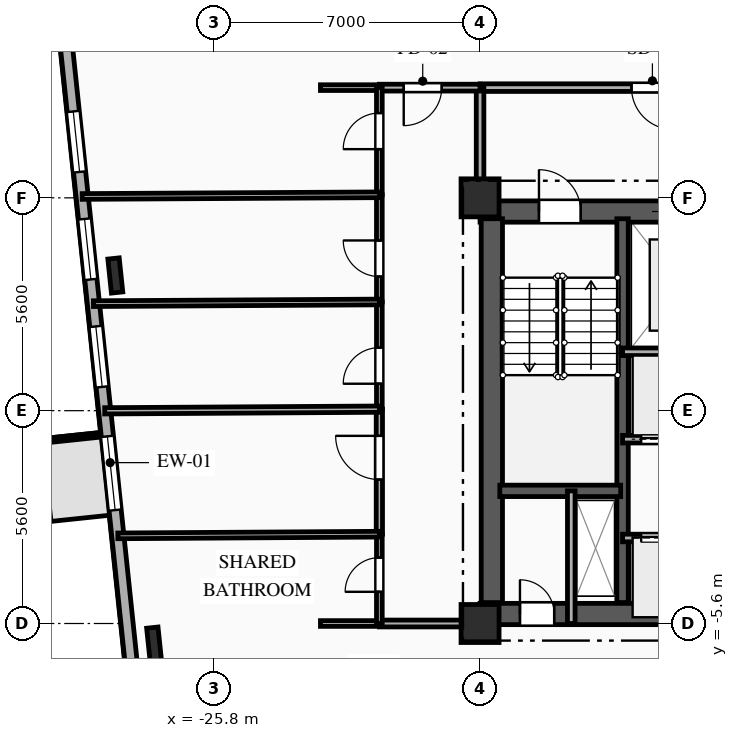
"""IFC4 building model, lengths in metres.
Left out: names, types, materials, properties, quantities, classifications, styles, units other than length and angle.
Written with IfcOpenShell. Run it as: python <this file> out.ifc"""

import sys

from ifc_helpers import new_model, si_unit, direction, frame, frame_2d, origin, origin_2d, place, context, subcontext, project, spatial, rectangle, i_section, extrude, element, fill, save


model = new_model("IFC4")
c1 = context("Model", 3, precision=1e-05, world=origin(), true_north=direction((0.0, 1.0)))
c2 = subcontext(c1, "Body", "Model", "MODEL_VIEW")
j1 = project(units=[si_unit("LENGTHUNIT", "METRE"), si_unit("PLANEANGLEUNIT", "RADIAN")], contexts=[c1])
p1 = place(None, origin())
s1 = spatial("IfcSite", under=j1, at=p1, CompositionType="ELEMENT")
p2 = place(p1, origin())
s2 = spatial("IfcBuilding", under=s1, at=p2, CompositionType="ELEMENT")
p3 = place(p2, frame((0.0, 0.0, 85.7)))
s3 = spatial("IfcBuildingStorey", under=s2, at=p3, CompositionType="ELEMENT", Elevation=85.7)
for number, where, z_axis, x_axis in (
    (1, (-18.8, -5.6, 0.0), (0.0, 0.0, 1.0), (1.0, 0.0, 0.0)),
    (2, (-18.8, 5.6, 0.0), (0.0, 0.0, 1.0), (1.0, 0.0, 0.0)),
):
    element("IfcColumn", number, at=place(p3, frame(where, z_axis=z_axis, x_axis=x_axis)), inside=s3, PredefinedType="COLUMN", context=c2, shape_type="SweptSolid", body=[
        extrude(rectangle(XDim=1.0, YDim=1.0, at=origin_2d()), origin(), (0.0, 0.0, 1.0), 3.35),
    ])
for number, where, z_axis, x_axis in (
    (3, (-28.398, 3.557, 0.0), (0.0, 0.0, 1.0), (0.995, 0.105, 0.0)),
    (4, (-27.377, -6.156, 0.0), (0.0, 0.0, 1.0), (0.995, 0.105, 0.0)),
):
    element("IfcColumn", number, at=place(p3, frame(where, z_axis=z_axis, x_axis=x_axis)), inside=s3, PredefinedType="COLUMN", context=c2, shape_type="SweptSolid", body=[
        extrude(i_section(OverallWidth=0.3, OverallDepth=0.9, WebThickness=0.019, FlangeThickness=0.035, FilletRadius=0.03, at=origin_2d()), origin(), (0.0, 0.0, 1.0), 3.35),
    ])
p4 = place(p3, frame((-26.935, -16.583, 0.0), z_axis=(0.0, 0.0, 1.0), x_axis=(-0.104524887486, 0.994522271192, 0.0)))
e5 = element("IfcWall", 5, at=p4, inside=s3, PredefinedType="SOLIDWALL", context=c2, shape_type="SweptSolid", body=[
    extrude(rectangle(XDim=30.6, YDim=0.32, at=frame_2d((15.3, 0.0))), origin(), (0.0, 0.0, 1.0), 3.045),
])
p5 = place(p4, frame((14.045, 0.0, 0.85)))
e6 = element("IfcOpeningElement", 6, at=p5, cuts=e5, PredefinedType="OPENING", context=c2, shape_type="SweptSolid", body=[
    extrude(rectangle(XDim=1.95, YDim=1.85, at=frame_2d((0.975, 0.925))), frame((0.0, 0.17, 0.0), z_axis=(0.0, -1.0, 0.0), x_axis=(1.0, 0.0, 0.0)), (0.0, 0.0, 1.0), 0.34),
])
p6 = place(p4, frame((17.304, 0.0, 0.85)))
e7 = element("IfcOpeningElement", 7, at=p6, cuts=e5, PredefinedType="OPENING", context=c2, shape_type="SweptSolid", body=[
    extrude(rectangle(XDim=1.6, YDim=1.85, at=frame_2d((0.8, 0.925))), frame((0.0, 0.17, 0.0), z_axis=(0.0, -1.0, 0.0), x_axis=(1.0, 0.0, 0.0)), (0.0, 0.0, 1.0), 0.34),
])
p7 = place(p4, frame((20.147, 0.0, 0.85)))
e8 = element("IfcOpeningElement", 8, at=p7, cuts=e5, PredefinedType="OPENING", context=c2, shape_type="SweptSolid", body=[
    extrude(rectangle(XDim=1.6, YDim=1.85, at=frame_2d((0.8, 0.925))), frame((0.0, 0.17, 0.0), z_axis=(0.0, -1.0, 0.0), x_axis=(1.0, 0.0, 0.0)), (0.0, 0.0, 1.0), 0.34),
])
p8 = place(p4, frame((22.991, 0.0, 0.85)))
e9 = element("IfcOpeningElement", 9, at=p8, cuts=e5, PredefinedType="OPENING", context=c2, shape_type="SweptSolid", body=[
    extrude(rectangle(XDim=1.6, YDim=1.85, at=frame_2d((0.8, 0.925))), frame((0.0, 0.17, 0.0), z_axis=(0.0, -1.0, 0.0), x_axis=(1.0, 0.0, 0.0)), (0.0, 0.0, 1.0), 0.34),
])
p9 = place(p3, frame((-18.8, 5.24, 0.0), z_axis=(0.0, 0.0, 1.0), x_axis=(1.0, 0.0, 0.0)))
e10 = element("IfcWall", 10, at=p9, inside=s3, PredefinedType="SHEAR", context=c2, shape_type="SweptSolid", body=[
    extrude(rectangle(XDim=9.6, YDim=0.56, at=frame_2d((4.8, 0.0))), origin(), (0.0, 0.0, 1.0), 3.045),
])
p10 = place(p9, frame((1.55, 0.0, 0.0)))
e11 = element("IfcOpeningElement", 11, at=p10, cuts=e10, PredefinedType="OPENING", context=c2, shape_type="SweptSolid", body=[
    extrude(rectangle(XDim=1.1, YDim=2.15, at=frame_2d((0.55, 1.075))), frame((0.0, 0.29, 0.0), z_axis=(0.0, -1.0, 0.0), x_axis=(1.0, 0.0, 0.0)), (0.0, 0.0, 1.0), 0.58),
])
p11 = place(p9, frame((4.775, 0.0, 0.0)))
e12 = element("IfcOpeningElement", 12, at=p11, cuts=e10, PredefinedType="OPENING", context=c2, shape_type="SweptSolid", body=[
    extrude(rectangle(XDim=1.05, YDim=2.1, at=frame_2d((0.525, 1.05))), frame((0.0, 0.29, 0.0), z_axis=(0.0, -1.0, 0.0), x_axis=(1.0, 0.0, 0.0)), (0.0, 0.0, 1.0), 0.58),
])
p12 = place(p3, frame((-18.8, -5.35, 0.0), z_axis=(0.0, 0.0, 1.0), x_axis=(1.0, 0.0, 0.0)))
e13 = element("IfcWall", 13, at=p12, inside=s3, PredefinedType="SHEAR", context=c2, shape_type="SweptSolid", body=[
    extrude(rectangle(XDim=9.6, YDim=0.56, at=frame_2d((4.8, 0.0))), origin(), (0.0, 0.0, 1.0), 3.045),
])
p13 = place(p12, frame((1.05, 0.0, 0.0)))
e14 = element("IfcOpeningElement", 14, at=p13, cuts=e13, PredefinedType="OPENING", context=c2, shape_type="SweptSolid", body=[
    extrude(rectangle(XDim=0.9, YDim=2.1, at=frame_2d((0.45, 1.05))), frame((0.0, 0.29, 0.0), z_axis=(0.0, -1.0, 0.0), x_axis=(1.0, 0.0, 0.0)), (0.0, 0.0, 1.0), 0.58),
])
p14 = place(p3, frame((-18.49, -5.05, 0.0), z_axis=(0.0, 0.0, 1.0), x_axis=(0.0, 1.0, 0.0)))
e15 = element("IfcWall", 15, at=p14, inside=s3, PredefinedType="SHEAR", context=c2, shape_type="SweptSolid", body=[
    extrude(rectangle(XDim=10.1, YDim=0.56, at=frame_2d((5.05, 0.0))), origin(), (0.0, 0.0, 1.0), 3.045),
])
p15 = place(p3, frame((-15.05, -5.05, 0.0), z_axis=(0.0, 0.0, 1.0), x_axis=(0.0, 1.0, 0.0)))
e16 = element("IfcWall", 16, at=p15, inside=s3, PredefinedType="SHEAR", context=c2, shape_type="SweptSolid", body=[
    extrude(rectangle(XDim=10.1, YDim=0.3, at=frame_2d((5.05, 0.0))), origin(), (0.0, 0.0, 1.0), 3.045),
])
p16 = place(p3, frame((-18.28, -2.11, 0.0), z_axis=(0.0, 0.0, 1.0), x_axis=(1.0, 0.0, 0.0)))
e17 = element("IfcWall", 17, at=p16, inside=s3, PredefinedType="SHEAR", context=c2, shape_type="SweptSolid", body=[
    extrude(rectangle(XDim=3.18, YDim=0.3, at=frame_2d((1.59, 0.0))), origin(), (0.0, 0.0, 1.0), 3.045),
])
p17 = place(p3, frame((-16.4, -5.6, 0.0), z_axis=(0.0, 0.0, 1.0), x_axis=(0.0, 1.0, 0.0)))
e18 = element("IfcWall", 18, at=p17, inside=s3, PredefinedType="PARTITIONING", context=c2, shape_type="SweptSolid", body=[
    extrude(rectangle(XDim=3.49, YDim=0.2, at=frame_2d((1.745, 0.0))), origin(), (0.0, 0.0, 1.0), 3.045),
])
p18 = place(p3, frame((-12.0, 8.5, 0.0), z_axis=(0.0, 0.0, 1.0), x_axis=(-1.0, 0.0, 0.0)))
e19 = element("IfcWall", 19, at=p18, inside=s3, PredefinedType="PARTITIONING", context=c2, shape_type="SweptSolid", body=[
    extrude(rectangle(XDim=6.8, YDim=0.2, at=frame_2d((3.4, 0.0))), origin(), (0.0, 0.0, 1.0), 3.045),
])
p19 = place(p18, frame((1.715, 0.0, 0.0)))
e20 = element("IfcOpeningElement", 20, at=p19, cuts=e19, PredefinedType="OPENING", context=c2, shape_type="SweptSolid", body=[
    extrude(rectangle(XDim=1.1, YDim=2.15, at=frame_2d((0.55, 1.075))), frame((0.0, 0.11, 0.0), z_axis=(0.0, -1.0, 0.0), x_axis=(1.0, 0.0, 0.0)), (0.0, 0.0, 1.0), 0.22),
])
p20 = place(p3, frame((-18.8, 8.5, 0.0), z_axis=(0.0, 0.0, 1.0), x_axis=(0.0, -1.0, 0.0)))
e21 = element("IfcWall", 21, at=p20, inside=s3, PredefinedType="PARTITIONING", context=c2, shape_type="SweptSolid", body=[
    extrude(rectangle(XDim=2.9, YDim=0.2, at=frame_2d((1.45, 0.0))), origin(), (0.0, 0.0, 1.0), 2.53),
])
p21 = place(p3, frame((-15.05, -3.35, 0.0), z_axis=(0.0, 0.0, 1.0), x_axis=(1.0, 0.0, 0.0)))
e22 = element("IfcWall", 22, at=p21, inside=s3, PredefinedType="PARTITIONING", context=c2, shape_type="SweptSolid", body=[
    extrude(rectangle(XDim=2.03, YDim=0.2, at=frame_2d((1.015, 0.0))), origin(), (0.0, 0.0, 1.0), 3.045),
])
p22 = place(p21, frame((0.49, 0.0, 0.0)))
e23 = element("IfcOpeningElement", 23, at=p22, cuts=e22, PredefinedType="OPENING", context=c2, shape_type="SweptSolid", body=[
    extrude(rectangle(XDim=1.05, YDim=2.1, at=frame_2d((0.525, 1.05))), frame((0.0, 0.11, 0.0), z_axis=(0.0, -1.0, 0.0), x_axis=(1.0, 0.0, 0.0)), (0.0, 0.0, 1.0), 0.22),
])
p23 = place(p3, frame((-13.02, -0.75, 0.0), z_axis=(0.0, 0.0, 1.0), x_axis=(-1.0, 0.0, 0.0)))
e24 = element("IfcWall", 24, at=p23, inside=s3, PredefinedType="PARTITIONING", context=c2, shape_type="SweptSolid", body=[
    extrude(rectangle(XDim=2.03, YDim=0.2, at=frame_2d((1.015, 0.0))), origin(), (0.0, 0.0, 1.0), 3.045),
])
p24 = place(p23, frame((0.49, 0.0, 0.0)))
e25 = element("IfcOpeningElement", 25, at=p24, cuts=e24, PredefinedType="OPENING", context=c2, shape_type="SweptSolid", body=[
    extrude(rectangle(XDim=1.05, YDim=2.1, at=frame_2d((0.525, 1.05))), frame((0.0, 0.11, 0.0), z_axis=(0.0, -1.0, 0.0), x_axis=(1.0, 0.0, 0.0)), (0.0, 0.0, 1.0), 0.22),
])
p25 = place(p3, frame((-18.8, 8.5, 0.0), z_axis=(0.0, 0.0, 1.0), x_axis=(-1.0, 0.0, 0.0)))
e26 = element("IfcWall", 26, at=p25, inside=s3, PredefinedType="PARTITIONING", context=c2, shape_type="SweptSolid", body=[
    extrude(rectangle(XDim=2.65, YDim=0.18, at=frame_2d((1.325, 0.0))), origin(), (0.0, 0.0, 1.0), 3.045),
])
p26 = place(p25, frame((1.009, 0.0, 0.0)))
e27 = element("IfcOpeningElement", 27, at=p26, cuts=e26, PredefinedType="OPENING", context=c2, shape_type="SweptSolid", body=[
    extrude(rectangle(XDim=1.0, YDim=2.15, at=frame_2d((0.5, 1.075))), frame((0.0, 0.1, 0.0), z_axis=(0.0, -1.0, 0.0), x_axis=(1.0, 0.0, 0.0)), (0.0, 0.0, 1.0), 0.2),
])
p27 = place(p3, frame((-21.45, 8.5, 0.0), z_axis=(0.0, 0.0, 1.0), x_axis=(-1.0, 0.0, 0.0)))
e28 = element("IfcWall", 28, at=p27, inside=s3, PredefinedType="PARTITIONING", context=c2, shape_type="SweptSolid", body=[
    extrude(rectangle(XDim=1.55, YDim=0.15, at=frame_2d((0.775, 0.0))), origin(), (0.0, 0.0, 1.0), 3.045),
])
p28 = place(p3, frame((-21.45, -5.6, 0.0), z_axis=(0.0, 0.0, 1.0), x_axis=(1.0, 0.0, 0.0)))
e29 = element("IfcWall", 29, at=p28, inside=s3, PredefinedType="PARTITIONING", context=c2, shape_type="SweptSolid", body=[
    extrude(rectangle(XDim=2.65, YDim=0.18, at=frame_2d((1.325, 0.0))), origin(), (0.0, 0.0, 1.0), 3.045),
])
p29 = place(p3, frame((-23.0, -5.6, 0.0), z_axis=(0.0, 0.0, 1.0), x_axis=(1.0, 0.0, 0.0)))
e30 = element("IfcWall", 30, at=p29, inside=s3, PredefinedType="PLUMBINGWALL", context=c2, shape_type="SweptSolid", body=[
    extrude(rectangle(XDim=1.55, YDim=0.15, at=frame_2d((0.775, 0.0))), origin(), (0.0, 0.0, 1.0), 3.045),
])
p30 = place(p3, frame((-21.45, -5.6, 0.0), z_axis=(0.0, 0.0, 1.0), x_axis=(0.0, 1.0, 0.0)))
e31 = element("IfcWall", 31, at=p30, inside=s3, PredefinedType="PLUMBINGWALL", context=c2, shape_type="SweptSolid", body=[
    extrude(rectangle(XDim=2.35, YDim=0.15, at=frame_2d((1.175, 0.0))), origin(), (0.0, 0.0, 1.0), 3.045),
])
p31 = place(p30, frame((0.834, 0.0, 0.0)))
e32 = element("IfcOpeningElement", 32, at=p31, cuts=e31, PredefinedType="OPENING", context=c2, shape_type="SweptSolid", body=[
    extrude(rectangle(XDim=0.9, YDim=2.1, at=frame_2d((0.45, 1.05))), frame((0.0, 0.085, 0.0), z_axis=(0.0, -1.0, 0.0), x_axis=(1.0, 0.0, 0.0)), (0.0, 0.0, 1.0), 0.17),
])
p32 = place(p3, frame((-21.45, -3.25, 0.0), z_axis=(0.0, 0.0, 1.0), x_axis=(0.0, 1.0, 0.0)))
e33 = element("IfcWall", 33, at=p32, inside=s3, PredefinedType="PARTITIONING", context=c2, shape_type="SweptSolid", body=[
    extrude(rectangle(XDim=3.29, YDim=0.165, at=frame_2d((1.645, 0.0))), origin(), (0.0, 0.0, 1.0), 3.045),
])
p33 = place(p32, frame((1.438, 0.0, 0.0)))
e34 = element("IfcOpeningElement", 34, at=p33, cuts=e33, PredefinedType="OPENING", context=c2, shape_type="SweptSolid", body=[
    extrude(rectangle(XDim=1.15, YDim=2.15, at=frame_2d((0.575, 1.075))), frame((0.0, 0.093, 0.0), z_axis=(0.0, -1.0, 0.0), x_axis=(1.0, 0.0, 0.0)), (0.0, 0.0, 1.0), 0.185),
])
p34 = place(p3, frame((-21.45, 0.04, 0.0), z_axis=(0.0, 0.0, 1.0), x_axis=(0.0, 1.0, 0.0)))
e35 = element("IfcWall", 35, at=p34, inside=s3, PredefinedType="PARTITIONING", context=c2, shape_type="SweptSolid", body=[
    extrude(rectangle(XDim=2.82, YDim=0.15, at=frame_2d((1.41, 0.0))), origin(), (0.0, 0.0, 1.0), 3.045),
])
p35 = place(p34, frame((0.669, 0.0, 0.0)))
e36 = element("IfcOpeningElement", 36, at=p35, cuts=e35, PredefinedType="OPENING", context=c2, shape_type="SweptSolid", body=[
    extrude(rectangle(XDim=0.95, YDim=2.1, at=frame_2d((0.475, 1.05))), frame((0.0, 0.085, 0.0), z_axis=(0.0, -1.0, 0.0), x_axis=(1.0, 0.0, 0.0)), (0.0, 0.0, 1.0), 0.17),
])
p36 = place(p3, frame((-21.45, 2.86, 0.0), z_axis=(0.0, 0.0, 1.0), x_axis=(0.0, 1.0, 0.0)))
e37 = element("IfcWall", 37, at=p36, inside=s3, PredefinedType="PARTITIONING", context=c2, shape_type="SweptSolid", body=[
    extrude(rectangle(XDim=2.82, YDim=0.15, at=frame_2d((1.41, 0.0))), origin(), (0.0, 0.0, 1.0), 3.045),
])
p37 = place(p36, frame((0.669, 0.0, 0.0)))
e38 = element("IfcOpeningElement", 38, at=p37, cuts=e37, PredefinedType="OPENING", context=c2, shape_type="SweptSolid", body=[
    extrude(rectangle(XDim=0.95, YDim=2.1, at=frame_2d((0.475, 1.05))), frame((0.0, 0.085, 0.0), z_axis=(0.0, -1.0, 0.0), x_axis=(1.0, 0.0, 0.0)), (0.0, 0.0, 1.0), 0.17),
])
p38 = place(p3, frame((-21.45, 5.68, 0.0), z_axis=(0.0, 0.0, 1.0), x_axis=(0.0, 1.0, 0.0)))
e39 = element("IfcWall", 39, at=p38, inside=s3, PredefinedType="PARTITIONING", context=c2, shape_type="SweptSolid", body=[
    extrude(rectangle(XDim=2.82, YDim=0.15, at=frame_2d((1.41, 0.0))), origin(), (0.0, 0.0, 1.0), 3.045),
])
p39 = place(p38, frame((1.201, 0.0, 0.0)))
e40 = element("IfcOpeningElement", 40, at=p39, cuts=e39, PredefinedType="OPENING", context=c2, shape_type="SweptSolid", body=[
    extrude(rectangle(XDim=0.95, YDim=2.1, at=frame_2d((0.475, 1.05))), frame((0.0, 0.085, 0.0), z_axis=(0.0, -1.0, 0.0), x_axis=(1.0, 0.0, 0.0)), (0.0, 0.0, 1.0), 0.17),
])
p40 = place(p3, frame((-28.332, -3.294, 0.0), z_axis=(0.0, 0.0, 1.0), x_axis=(0.99997961062, 0.006385792383, 0.0)))
e41 = element("IfcWall", 41, at=p40, inside=s3, PredefinedType="PLUMBINGWALL", context=c2, shape_type="SweptSolid", body=[
    extrude(rectangle(XDim=6.882, YDim=0.15, at=frame_2d((3.441, 0.0))), origin(), (0.0, 0.0, 1.0), 3.045),
])
p41 = place(p3, frame((-28.677, -0.004, 0.0), z_axis=(0.0, 0.0, 1.0), x_axis=(0.999981514486, 0.006080352417, 0.0)))
e42 = element("IfcWall", 42, at=p41, inside=s3, PredefinedType="PARTITIONING", context=c2, shape_type="SweptSolid", body=[
    extrude(rectangle(XDim=7.228, YDim=0.165, at=frame_2d((3.614, 0.0))), origin(), (0.0, 0.0, 1.0), 3.045),
])
p42 = place(p3, frame((-28.974, 2.816, 0.0), z_axis=(0.0, 0.0, 1.0), x_axis=(0.999982942193, 0.00584083232, 0.0)))
e43 = element("IfcWall", 43, at=p42, inside=s3, PredefinedType="PARTITIONING", context=c2, shape_type="SweptSolid", body=[
    extrude(rectangle(XDim=7.524, YDim=0.15, at=frame_2d((3.762, 0.0))), origin(), (0.0, 0.0, 1.0), 2.53),
])
p43 = place(p3, frame((-29.27, 5.636, 0.0), z_axis=(0.0, 0.0, 1.0), x_axis=(0.999984210669, 0.005619467326, 0.0)))
e44 = element("IfcWall", 44, at=p43, inside=s3, PredefinedType="PARTITIONING", context=c2, shape_type="SweptSolid", body=[
    extrude(rectangle(XDim=7.82, YDim=0.15, at=frame_2d((3.91, 0.0))), origin(), (0.0, 0.0, 1.0), 3.045),
])
p44 = place(p3, frame((-15.05, 1.55, 0.0), z_axis=(0.0, 0.0, 1.0), x_axis=(1.0, 0.0, 0.0)))
e45 = element("IfcWall", 45, at=p44, inside=s3, PredefinedType="PARTITIONING", context=c2, shape_type="SweptSolid", body=[
    extrude(rectangle(XDim=5.85, YDim=0.2, at=frame_2d((2.925, 0.0))), origin(), (0.0, 0.0, 1.0), 3.045),
])
p45 = place(p5, origin())
e46 = element("IfcWindow", 46, at=p45, inside=s3, PartitioningType="SINGLE_PANEL", PredefinedType="WINDOW", context=c2, shape_type="SweptSolid", body=[
    extrude(rectangle(XDim=1.95, YDim=1.85, at=frame_2d((0.975, 0.925))), frame((0.0, 0.03, 0.0), z_axis=(0.0, -1.0, 0.0), x_axis=(1.0, 0.0, 0.0)), (0.0, 0.0, 1.0), 0.06),
])
fill(e6, e46)
p46 = place(p6, origin())
e47 = element("IfcWindow", 47, at=p46, inside=s3, PartitioningType="SINGLE_PANEL", PredefinedType="WINDOW", context=c2, shape_type="SweptSolid", body=[
    extrude(rectangle(XDim=1.6, YDim=1.85, at=frame_2d((0.8, 0.925))), frame((0.0, 0.03, 0.0), z_axis=(0.0, -1.0, 0.0), x_axis=(1.0, 0.0, 0.0)), (0.0, 0.0, 1.0), 0.06),
])
fill(e7, e47)
p47 = place(p7, origin())
e48 = element("IfcWindow", 48, at=p47, inside=s3, PartitioningType="SINGLE_PANEL", PredefinedType="WINDOW", context=c2, shape_type="SweptSolid", body=[
    extrude(rectangle(XDim=1.6, YDim=1.85, at=frame_2d((0.8, 0.925))), frame((0.0, 0.03, 0.0), z_axis=(0.0, -1.0, 0.0), x_axis=(1.0, 0.0, 0.0)), (0.0, 0.0, 1.0), 0.06),
])
fill(e8, e48)
p48 = place(p8, origin())
e49 = element("IfcWindow", 49, at=p48, inside=s3, PartitioningType="SINGLE_PANEL", PredefinedType="WINDOW", context=c2, shape_type="SweptSolid", body=[
    extrude(rectangle(XDim=1.6, YDim=1.85, at=frame_2d((0.8, 0.925))), frame((0.0, 0.03, 0.0), z_axis=(0.0, -1.0, 0.0), x_axis=(1.0, 0.0, 0.0)), (0.0, 0.0, 1.0), 0.06),
])
fill(e9, e49)
p49 = place(p10, origin())
e50 = element("IfcDoor", 50, at=p49, inside=s3, OperationType="SINGLE_SWING_LEFT", PredefinedType="DOOR", context=c2, shape_type="SweptSolid", body=[
    extrude(rectangle(XDim=1.1, YDim=2.15, at=frame_2d((0.55, 1.075))), frame((0.0, 0.025, 0.0), z_axis=(0.0, -1.0, 0.0), x_axis=(1.0, 0.0, 0.0)), (0.0, 0.0, 1.0), 0.05),
])
fill(e11, e50)
p50 = place(p13, origin())
e51 = element("IfcDoor", 51, at=p50, inside=s3, OperationType="SINGLE_SWING_LEFT", PredefinedType="DOOR", context=c2, shape_type="SweptSolid", body=[
    extrude(rectangle(XDim=0.9, YDim=2.1, at=frame_2d((0.45, 1.05))), frame((0.0, 0.025, 0.0), z_axis=(0.0, -1.0, 0.0), x_axis=(1.0, 0.0, 0.0)), (0.0, 0.0, 1.0), 0.05),
])
fill(e14, e51)
p51 = place(p19, origin())
e52 = element("IfcDoor", 52, at=p51, inside=s3, OperationType="SINGLE_SWING_LEFT", PredefinedType="DOOR", context=c2, shape_type="SweptSolid", body=[
    extrude(rectangle(XDim=1.1, YDim=2.15, at=frame_2d((0.55, 1.075))), frame((0.0, 0.025, 0.0), z_axis=(0.0, -1.0, 0.0), x_axis=(1.0, 0.0, 0.0)), (0.0, 0.0, 1.0), 0.05),
])
fill(e20, e52)
p52 = place(p22, origin())
e53 = element("IfcDoor", 53, at=p52, inside=s3, OperationType="DOUBLE_DOOR_SLIDING", PredefinedType="DOOR", context=c2, shape_type="SweptSolid", body=[
    extrude(rectangle(XDim=1.05, YDim=2.1, at=frame_2d((0.525, 1.05))), frame((0.0, 0.025, 0.0), z_axis=(0.0, -1.0, 0.0), x_axis=(1.0, 0.0, 0.0)), (0.0, 0.0, 1.0), 0.05),
])
fill(e23, e53)
p53 = place(p24, origin())
e54 = element("IfcDoor", 54, at=p53, inside=s3, OperationType="DOUBLE_DOOR_SLIDING", PredefinedType="DOOR", context=c2, shape_type="SweptSolid", body=[
    extrude(rectangle(XDim=1.05, YDim=2.1, at=frame_2d((0.525, 1.05))), frame((0.0, 0.025, 0.0), z_axis=(0.0, -1.0, 0.0), x_axis=(1.0, 0.0, 0.0)), (0.0, 0.0, 1.0), 0.05),
])
fill(e25, e54)
p54 = place(p26, origin())
e55 = element("IfcDoor", 55, at=p54, inside=s3, OperationType="SINGLE_SWING_RIGHT", PredefinedType="DOOR", context=c2, shape_type="SweptSolid", body=[
    extrude(rectangle(XDim=1.0, YDim=2.15, at=frame_2d((0.5, 1.075))), frame((0.0, 0.025, 0.0), z_axis=(0.0, -1.0, 0.0), x_axis=(1.0, 0.0, 0.0)), (0.0, 0.0, 1.0), 0.05),
])
fill(e27, e55)
p55 = place(p31, origin())
e56 = element("IfcDoor", 56, at=p55, inside=s3, OperationType="SINGLE_SWING_LEFT", PredefinedType="DOOR", context=c2, shape_type="SweptSolid", body=[
    extrude(rectangle(XDim=0.9, YDim=2.1, at=frame_2d((0.45, 1.05))), frame((0.0, 0.025, 0.0), z_axis=(0.0, -1.0, 0.0), x_axis=(1.0, 0.0, 0.0)), (0.0, 0.0, 1.0), 0.05),
])
fill(e32, e56)
p56 = place(p33, origin())
e57 = element("IfcDoor", 57, at=p56, inside=s3, OperationType="SINGLE_SWING_RIGHT", PredefinedType="DOOR", context=c2, shape_type="SweptSolid", body=[
    extrude(rectangle(XDim=1.15, YDim=2.15, at=frame_2d((0.575, 1.075))), frame((0.0, 0.025, 0.0), z_axis=(0.0, -1.0, 0.0), x_axis=(1.0, 0.0, 0.0)), (0.0, 0.0, 1.0), 0.05),
])
fill(e34, e57)
p57 = place(p35, origin())
e58 = element("IfcDoor", 58, at=p57, inside=s3, OperationType="SINGLE_SWING_LEFT", PredefinedType="DOOR", context=c2, shape_type="SweptSolid", body=[
    extrude(rectangle(XDim=0.95, YDim=2.1, at=frame_2d((0.475, 1.05))), frame((0.0, 0.025, 0.0), z_axis=(0.0, -1.0, 0.0), x_axis=(1.0, 0.0, 0.0)), (0.0, 0.0, 1.0), 0.05),
])
fill(e36, e58)
p58 = place(p37, origin())
e59 = element("IfcDoor", 59, at=p58, inside=s3, OperationType="SINGLE_SWING_RIGHT", PredefinedType="DOOR", context=c2, shape_type="SweptSolid", body=[
    extrude(rectangle(XDim=0.95, YDim=2.1, at=frame_2d((0.475, 1.05))), frame((0.0, 0.025, 0.0), z_axis=(0.0, -1.0, 0.0), x_axis=(1.0, 0.0, 0.0)), (0.0, 0.0, 1.0), 0.05),
])
fill(e38, e59)
p59 = place(p39, origin())
e60 = element("IfcDoor", 60, at=p59, inside=s3, OperationType="SINGLE_SWING_LEFT", PredefinedType="DOOR", context=c2, shape_type="SweptSolid", body=[
    extrude(rectangle(XDim=0.95, YDim=2.1, at=frame_2d((0.475, 1.05))), frame((0.0, 0.025, 0.0), z_axis=(0.0, -1.0, 0.0), x_axis=(1.0, 0.0, 0.0)), (0.0, 0.0, 1.0), 0.05),
])
fill(e40, e60)
save(model, sys.argv[1])
